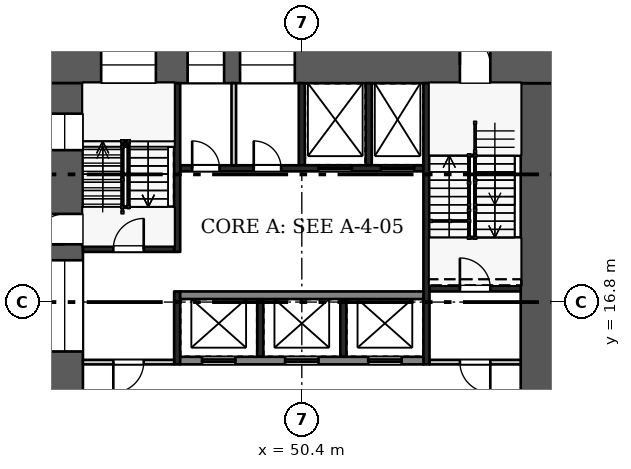
"""IFC4 building model, lengths in metres.
Left out: names, types, materials, properties, quantities, classifications, styles, units other than length and angle.
Written with IfcOpenShell. Run it as: python <this file> out.ifc"""

import sys

from ifc_helpers import new_model, si_unit, direction, frame, frame_2d, origin, place, context, subcontext, project, spatial, rectangle, extrude, element, fill, save


model = new_model("IFC4")
c1 = context("Model", 3, precision=1e-05, world=origin(), true_north=direction((0.0, 1.0)))
c2 = subcontext(c1, "Body", "Model", "MODEL_VIEW")
j1 = project(units=[si_unit("LENGTHUNIT", "METRE"), si_unit("PLANEANGLEUNIT", "RADIAN")], contexts=[c1])
p1 = place(None, origin())
s1 = spatial("IfcSite", under=j1, at=p1, CompositionType="ELEMENT")
p2 = place(p1, origin())
s2 = spatial("IfcBuilding", under=s1, at=p2, CompositionType="ELEMENT")
p3 = place(p2, origin())
s3 = spatial("IfcBuildingStorey", under=s2, at=p3, CompositionType="ELEMENT", Elevation=0.0)
p4 = place(p3, frame((42.0, 24.6, 0.0), z_axis=(0.0, 0.0, 1.0), x_axis=(1.0, 0.0, 0.0)))
e1 = element("IfcWall", 1, at=p4, inside=s3, PredefinedType="SHEAR", context=c2, shape_type="SweptSolid", body=[
    extrude(rectangle(XDim=16.8, YDim=1.2, at=frame_2d((8.4, 0.0))), origin(), (0.0, 0.0, 1.0), 8.7),
])
p5 = place(p4, frame((13.6, 0.0, 0.0)))
e2 = element("IfcOpeningElement", 2, at=p5, cuts=e1, PredefinedType="OPENING", context=c2, shape_type="SweptSolid", body=[
    extrude(rectangle(XDim=1.0, YDim=2.1, at=frame_2d((0.5, 1.05))), frame((0.0, 0.61, 0.0), z_axis=(0.0, -1.0, 0.0), x_axis=(1.0, 0.0, 0.0)), (0.0, 0.0, 1.0), 1.22),
])
p6 = place(p4, frame((1.8, 0.0, 0.5)))
e3 = element("IfcOpeningElement", 3, at=p6, cuts=e1, PredefinedType="OPENING", context=c2, shape_type="SweptSolid", body=[
    extrude(rectangle(XDim=1.8, YDim=2.4, at=frame_2d((0.9, 1.2))), frame((0.0, 0.61, 0.0), z_axis=(0.0, -1.0, 0.0), x_axis=(1.0, 0.0, 0.0)), (0.0, 0.0, 1.0), 1.22),
])
p7 = place(p4, frame((4.644, 0.0, 1.6)))
e4 = element("IfcOpeningElement", 4, at=p7, cuts=e1, PredefinedType="OPENING", context=c2, shape_type="SweptSolid", body=[
    extrude(rectangle(XDim=1.2, YDim=1.2, at=frame_2d((0.6, 0.6))), frame((0.0, 0.61, 0.0), z_axis=(0.0, -1.0, 0.0), x_axis=(1.0, 0.0, 0.0)), (0.0, 0.0, 1.0), 1.22),
])
p8 = place(p4, frame((6.369, 0.0, 1.6)))
e5 = element("IfcOpeningElement", 5, at=p8, cuts=e1, PredefinedType="OPENING", context=c2, shape_type="SweptSolid", body=[
    extrude(rectangle(XDim=1.8, YDim=1.2, at=frame_2d((0.9, 0.6))), frame((0.0, 0.61, 0.0), z_axis=(0.0, -1.0, 0.0), x_axis=(1.0, 0.0, 0.0)), (0.0, 0.0, 1.0), 1.22),
])
p9 = place(p3, frame((42.6, 9.6, 0.0), z_axis=(0.0, 0.0, 1.0), x_axis=(0.0, 1.0, 0.0)))
e6 = element("IfcWall", 6, at=p9, inside=s3, PredefinedType="SHEAR", context=c2, shape_type="SweptSolid", body=[
    extrude(rectangle(XDim=14.4, YDim=1.2, at=frame_2d((7.2, 0.0))), origin(), (0.0, 0.0, 1.0), 8.7),
])
p10 = place(p9, frame((2.1, 0.0, 0.0)))
e7 = element("IfcOpeningElement", 7, at=p10, cuts=e6, PredefinedType="OPENING", context=c2, shape_type="SweptSolid", body=[
    extrude(rectangle(XDim=1.8, YDim=2.1, at=frame_2d((0.9, 1.05))), frame((0.0, 0.61, 0.0), z_axis=(0.0, -1.0, 0.0), x_axis=(1.0, 0.0, 0.0)), (0.0, 0.0, 1.0), 1.22),
])
p11 = place(p9, frame((9.1, 0.0, 0.0)))
e8 = element("IfcOpeningElement", 8, at=p11, cuts=e6, PredefinedType="OPENING", context=c2, shape_type="SweptSolid", body=[
    extrude(rectangle(XDim=1.0, YDim=2.1, at=frame_2d((0.5, 1.05))), frame((0.0, 0.61, 0.0), z_axis=(0.0, -1.0, 0.0), x_axis=(1.0, 0.0, 0.0)), (0.0, 0.0, 1.0), 1.22),
])
p12 = place(p9, frame((5.575, 0.0, 0.6)))
e9 = element("IfcOpeningElement", 9, at=p12, cuts=e6, PredefinedType="OPENING", context=c2, shape_type="SweptSolid", body=[
    extrude(rectangle(XDim=3.0, YDim=2.1, at=frame_2d((1.5, 1.05))), frame((0.0, 0.61, 0.0), z_axis=(0.0, -1.0, 0.0), x_axis=(1.0, 0.0, 0.0)), (0.0, 0.0, 1.0), 1.22),
])
p13 = place(p9, frame((12.197, 0.0, 0.5)))
e10 = element("IfcOpeningElement", 10, at=p13, cuts=e6, PredefinedType="OPENING", context=c2, shape_type="SweptSolid", body=[
    extrude(rectangle(XDim=1.2, YDim=2.4, at=frame_2d((0.6, 1.2))), frame((0.0, 0.61, 0.0), z_axis=(0.0, -1.0, 0.0), x_axis=(1.0, 0.0, 0.0)), (0.0, 0.0, 1.0), 1.22),
])
p14 = place(p3, frame((58.2, 9.6, 0.0), z_axis=(0.0, 0.0, 1.0), x_axis=(0.0, 1.0, 0.0)))
e11 = element("IfcWall", 11, at=p14, inside=s3, PredefinedType="SHEAR", context=c2, shape_type="SweptSolid", body=[
    extrude(rectangle(XDim=14.4, YDim=1.2, at=frame_2d((7.2, 0.0))), origin(), (0.0, 0.0, 1.0), 8.7),
])
p15 = place(p14, frame((2.1, 0.0, 0.0)))
e12 = element("IfcOpeningElement", 12, at=p15, cuts=e11, PredefinedType="OPENING", context=c2, shape_type="SweptSolid", body=[
    extrude(rectangle(XDim=1.8, YDim=2.1, at=frame_2d((0.9, 1.05))), frame((0.0, 0.61, 0.0), z_axis=(0.0, -1.0, 0.0), x_axis=(1.0, 0.0, 0.0)), (0.0, 0.0, 1.0), 1.22),
])
for number, where, z_axis, x_axis in (
    (13, (49.033, 15.0, 0.0), (0.0, 0.0, 1.0), (0.0, 1.0, 0.0)),
    (14, (51.767, 15.0, 0.0), (0.0, 0.0, 1.0), (0.0, 1.0, 0.0)),
):
    element("IfcWall", number, at=place(p3, frame(where, z_axis=z_axis, x_axis=x_axis)), inside=s3, PredefinedType="SHEAR", context=c2, shape_type="SweptSolid", body=[
        extrude(rectangle(XDim=1.9, YDim=0.2, at=frame_2d((0.95, 0.0))), origin(), (0.0, 0.0, 1.0), 8.7),
    ])
p16 = place(p3, frame((46.4, 14.875, 0.0), z_axis=(0.0, 0.0, 1.0), x_axis=(1.0, 0.0, 0.0)))
e15 = element("IfcWall", 15, at=p16, inside=s3, PredefinedType="SHEAR", context=c2, shape_type="SweptSolid", body=[
    extrude(rectangle(XDim=8.0, YDim=0.25, at=frame_2d((4.0, 0.0))), origin(), (0.0, 0.0, 1.0), 8.7),
])
p17 = place(p16, frame((0.717, 0.0, 0.0)))
e16 = element("IfcOpeningElement", 16, at=p17, cuts=e15, PredefinedType="OPENING", context=c2, shape_type="SweptSolid", body=[
    extrude(rectangle(XDim=1.1, YDim=2.1, at=frame_2d((0.55, 1.05))), frame((0.0, 0.135, 0.0), z_axis=(0.0, -1.0, 0.0), x_axis=(1.0, 0.0, 0.0)), (0.0, 0.0, 1.0), 0.27),
])
p18 = place(p16, frame((3.45, 0.0, 0.0)))
e17 = element("IfcOpeningElement", 17, at=p18, cuts=e15, PredefinedType="OPENING", context=c2, shape_type="SweptSolid", body=[
    extrude(rectangle(XDim=1.1, YDim=2.1, at=frame_2d((0.55, 1.05))), frame((0.0, 0.135, 0.0), z_axis=(0.0, -1.0, 0.0), x_axis=(1.0, 0.0, 0.0)), (0.0, 0.0, 1.0), 0.27),
])
p19 = place(p16, frame((6.183, 0.0, 0.0)))
e18 = element("IfcOpeningElement", 18, at=p19, cuts=e15, PredefinedType="OPENING", context=c2, shape_type="SweptSolid", body=[
    extrude(rectangle(XDim=1.1, YDim=2.1, at=frame_2d((0.55, 1.05))), frame((0.0, 0.135, 0.0), z_axis=(0.0, -1.0, 0.0), x_axis=(1.0, 0.0, 0.0)), (0.0, 0.0, 1.0), 0.27),
])
p20 = place(p3, frame((46.4, 17.025, 0.0), z_axis=(0.0, 0.0, 1.0), x_axis=(1.0, 0.0, 0.0)))
e19 = element("IfcWall", 19, at=p20, inside=s3, PredefinedType="SHEAR", context=c2, shape_type="SweptSolid", body=[
    extrude(rectangle(XDim=8.0, YDim=0.25, at=frame_2d((4.0, 0.0))), origin(), (0.0, 0.0, 1.0), 8.7),
])
for number, where, z_axis, x_axis in (
    (20, (50.4, 21.3, 0.0), (0.0, 0.0, 1.0), (0.0, 1.0, 0.0)),
    (21, (52.6, 21.3, 0.0), (0.0, 0.0, 1.0), (0.0, 1.0, 0.0)),
):
    element("IfcWall", number, at=place(p3, frame(where, z_axis=z_axis, x_axis=x_axis)), inside=s3, PredefinedType="SHEAR", context=c2, shape_type="SweptSolid", body=[
        extrude(rectangle(XDim=2.7, YDim=0.2, at=frame_2d((1.35, 0.0))), origin(), (0.0, 0.0, 1.0), 8.7),
    ])
p21 = place(p3, frame((48.163, 21.3, 0.0), z_axis=(0.0, 0.0, 1.0), x_axis=(0.0, 1.0, 0.0)))
e22 = element("IfcWall", 22, at=p21, inside=s3, PredefinedType="PARTITIONING", context=c2, shape_type="SweptSolid", body=[
    extrude(rectangle(XDim=2.7, YDim=0.15, at=frame_2d((1.35, 0.0))), origin(), (0.0, 0.0, 1.0), 8.7),
])
p22 = place(p3, frame((46.4, 21.2, 0.0), z_axis=(0.0, 0.0, 1.0), x_axis=(1.0, 0.0, 0.0)))
e23 = element("IfcWall", 23, at=p22, inside=s3, PredefinedType="SHEAR", context=c2, shape_type="SweptSolid", body=[
    extrude(rectangle(XDim=8.0, YDim=0.2, at=frame_2d((4.0, 0.0))), origin(), (0.0, 0.0, 1.0), 8.7),
])
p23 = place(p22, frame((0.394, 0.0, 0.0)))
e24 = element("IfcOpeningElement", 24, at=p23, cuts=e23, PredefinedType="OPENING", context=c2, shape_type="SweptSolid", body=[
    extrude(rectangle(XDim=0.9, YDim=2.1, at=frame_2d((0.45, 1.05))), frame((0.0, 0.11, 0.0), z_axis=(0.0, -1.0, 0.0), x_axis=(1.0, 0.0, 0.0)), (0.0, 0.0, 1.0), 0.22),
])
p24 = place(p22, frame((2.419, 0.0, 0.0)))
e25 = element("IfcOpeningElement", 25, at=p24, cuts=e23, PredefinedType="OPENING", context=c2, shape_type="SweptSolid", body=[
    extrude(rectangle(XDim=0.9, YDim=2.1, at=frame_2d((0.45, 1.05))), frame((0.0, 0.11, 0.0), z_axis=(0.0, -1.0, 0.0), x_axis=(1.0, 0.0, 0.0)), (0.0, 0.0, 1.0), 0.22),
])
p25 = place(p22, frame((4.55, 0.0, 0.0)))
e26 = element("IfcOpeningElement", 26, at=p25, cuts=e23, PredefinedType="OPENING", context=c2, shape_type="SweptSolid", body=[
    extrude(rectangle(XDim=1.1, YDim=2.1, at=frame_2d((0.55, 1.05))), frame((0.0, 0.11, 0.0), z_axis=(0.0, -1.0, 0.0), x_axis=(1.0, 0.0, 0.0)), (0.0, 0.0, 1.0), 0.22),
])
p26 = place(p22, frame((6.6, 0.0, 0.0)))
e27 = element("IfcOpeningElement", 27, at=p26, cuts=e23, PredefinedType="OPENING", context=c2, shape_type="SweptSolid", body=[
    extrude(rectangle(XDim=1.1, YDim=2.1, at=frame_2d((0.55, 1.05))), frame((0.0, 0.11, 0.0), z_axis=(0.0, -1.0, 0.0), x_axis=(1.0, 0.0, 0.0)), (0.0, 0.0, 1.0), 0.22),
])
p27 = place(p3, frame((46.3, 14.75, 0.0), z_axis=(0.0, 0.0, 1.0), x_axis=(0.0, 1.0, 0.0)))
e28 = element("IfcWall", 28, at=p27, inside=s3, PredefinedType="SHEAR", context=c2, shape_type="SweptSolid", body=[
    extrude(rectangle(XDim=2.4, YDim=0.2, at=frame_2d((1.2, 0.0))), origin(), (0.0, 0.0, 1.0), 8.7),
])
p28 = place(p3, frame((46.3, 18.45, 0.0), z_axis=(0.0, 0.0, 1.0), x_axis=(0.0, 1.0, 0.0)))
e29 = element("IfcWall", 29, at=p28, inside=s3, PredefinedType="SHEAR", context=c2, shape_type="SweptSolid", body=[
    extrude(rectangle(XDim=5.55, YDim=0.2, at=frame_2d((2.775, 0.0))), origin(), (0.0, 0.0, 1.0), 8.7),
])
p29 = place(p3, frame((43.2, 14.825, 0.0), z_axis=(0.0, 0.0, 1.0), x_axis=(1.0, 0.0, 0.0)))
e30 = element("IfcWall", 30, at=p29, inside=s3, PredefinedType="PARTITIONING", context=c2, shape_type="SweptSolid", body=[
    extrude(rectangle(XDim=3.0, YDim=0.15, at=frame_2d((1.5, 0.0))), origin(), (0.0, 0.0, 1.0), 8.7),
])
p30 = place(p29, frame((1.0, 0.0, 0.0)))
e31 = element("IfcOpeningElement", 31, at=p30, cuts=e30, PredefinedType="OPENING", context=c2, shape_type="SweptSolid", body=[
    extrude(rectangle(XDim=1.0, YDim=2.1, at=frame_2d((0.5, 1.05))), frame((0.0, 0.085, 0.0), z_axis=(0.0, -1.0, 0.0), x_axis=(1.0, 0.0, 0.0)), (0.0, 0.0, 1.0), 0.17),
])
p31 = place(p3, frame((43.2, 18.55, 0.0), z_axis=(0.0, 0.0, 1.0), x_axis=(1.0, 0.0, 0.0)))
e32 = element("IfcWall", 32, at=p31, inside=s3, PredefinedType="SHEAR", context=c2, shape_type="SweptSolid", body=[
    extrude(rectangle(XDim=3.0, YDim=0.2, at=frame_2d((1.5, 0.0))), origin(), (0.0, 0.0, 1.0), 8.7),
])
p32 = place(p31, frame((1.0, 0.0, 0.0)))
e33 = element("IfcOpeningElement", 33, at=p32, cuts=e32, PredefinedType="OPENING", context=c2, shape_type="SweptSolid", body=[
    extrude(rectangle(XDim=1.0, YDim=2.1, at=frame_2d((0.5, 1.05))), frame((0.0, 0.11, 0.0), z_axis=(0.0, -1.0, 0.0), x_axis=(1.0, 0.0, 0.0)), (0.0, 0.0, 1.0), 0.22),
])
p33 = place(p3, frame((54.5, 14.75, 0.0), z_axis=(0.0, 0.0, 1.0), x_axis=(0.0, 1.0, 0.0)))
e34 = element("IfcWall", 34, at=p33, inside=s3, PredefinedType="SHEAR", context=c2, shape_type="SweptSolid", body=[
    extrude(rectangle(XDim=9.25, YDim=0.2, at=frame_2d((4.625, 0.0))), origin(), (0.0, 0.0, 1.0), 8.7),
])
p34 = place(p3, frame((54.6, 14.825, 0.0), z_axis=(0.0, 0.0, 1.0), x_axis=(1.0, 0.0, 0.0)))
e35 = element("IfcWall", 35, at=p34, inside=s3, PredefinedType="PARTITIONING", context=c2, shape_type="SweptSolid", body=[
    extrude(rectangle(XDim=3.0, YDim=0.15, at=frame_2d((1.5, 0.0))), origin(), (0.0, 0.0, 1.0), 8.7),
])
p35 = place(p34, frame((1.0, 0.0, 0.0)))
e36 = element("IfcOpeningElement", 36, at=p35, cuts=e35, PredefinedType="OPENING", context=c2, shape_type="SweptSolid", body=[
    extrude(rectangle(XDim=1.0, YDim=2.1, at=frame_2d((0.5, 1.05))), frame((0.0, 0.085, 0.0), z_axis=(0.0, -1.0, 0.0), x_axis=(1.0, 0.0, 0.0)), (0.0, 0.0, 1.0), 0.17),
])
p36 = place(p3, frame((54.6, 17.25, 0.0), z_axis=(0.0, 0.0, 1.0), x_axis=(1.0, 0.0, 0.0)))
e37 = element("IfcWall", 37, at=p36, inside=s3, PredefinedType="SHEAR", context=c2, shape_type="SweptSolid", body=[
    extrude(rectangle(XDim=3.0, YDim=0.2, at=frame_2d((1.5, 0.0))), origin(), (0.0, 0.0, 1.0), 8.7),
])
p37 = place(p36, frame((1.0, 0.0, 0.0)))
e38 = element("IfcOpeningElement", 38, at=p37, cuts=e37, PredefinedType="OPENING", context=c2, shape_type="SweptSolid", body=[
    extrude(rectangle(XDim=1.0, YDim=2.1, at=frame_2d((0.5, 1.05))), frame((0.0, 0.11, 0.0), z_axis=(0.0, -1.0, 0.0), x_axis=(1.0, 0.0, 0.0)), (0.0, 0.0, 1.0), 0.22),
])
p38 = place(p5, origin())
e39 = element("IfcDoor", 39, at=p38, inside=s3, OperationType="SINGLE_SWING_LEFT", PredefinedType="DOOR", context=c2, shape_type="SweptSolid", body=[
    extrude(rectangle(XDim=1.0, YDim=2.1, at=frame_2d((0.5, 1.05))), frame((0.0, 0.025, 0.0), z_axis=(0.0, -1.0, 0.0), x_axis=(1.0, 0.0, 0.0)), (0.0, 0.0, 1.0), 0.05),
])
fill(e2, e39)
p39 = place(p11, origin())
e40 = element("IfcDoor", 40, at=p39, inside=s3, OperationType="SINGLE_SWING_LEFT", PredefinedType="DOOR", context=c2, shape_type="SweptSolid", body=[
    extrude(rectangle(XDim=1.0, YDim=2.1, at=frame_2d((0.5, 1.05))), frame((0.0, 0.025, 0.0), z_axis=(0.0, -1.0, 0.0), x_axis=(1.0, 0.0, 0.0)), (0.0, 0.0, 1.0), 0.05),
])
fill(e8, e40)
p40 = place(p17, origin())
e41 = element("IfcDoor", 41, at=p40, inside=s3, OperationType="DOUBLE_DOOR_SLIDING", PredefinedType="DOOR", context=c2, shape_type="SweptSolid", body=[
    extrude(rectangle(XDim=1.1, YDim=2.1, at=frame_2d((0.55, 1.05))), frame((0.0, 0.025, 0.0), z_axis=(0.0, -1.0, 0.0), x_axis=(1.0, 0.0, 0.0)), (0.0, 0.0, 1.0), 0.05),
])
fill(e16, e41)
p41 = place(p18, origin())
e42 = element("IfcDoor", 42, at=p41, inside=s3, OperationType="DOUBLE_DOOR_SLIDING", PredefinedType="DOOR", context=c2, shape_type="SweptSolid", body=[
    extrude(rectangle(XDim=1.1, YDim=2.1, at=frame_2d((0.55, 1.05))), frame((0.0, 0.025, 0.0), z_axis=(0.0, -1.0, 0.0), x_axis=(1.0, 0.0, 0.0)), (0.0, 0.0, 1.0), 0.05),
])
fill(e17, e42)
p42 = place(p19, origin())
e43 = element("IfcDoor", 43, at=p42, inside=s3, OperationType="DOUBLE_DOOR_SLIDING", PredefinedType="DOOR", context=c2, shape_type="SweptSolid", body=[
    extrude(rectangle(XDim=1.1, YDim=2.1, at=frame_2d((0.55, 1.05))), frame((0.0, 0.025, 0.0), z_axis=(0.0, -1.0, 0.0), x_axis=(1.0, 0.0, 0.0)), (0.0, 0.0, 1.0), 0.05),
])
fill(e18, e43)
p43 = place(p23, origin())
e44 = element("IfcDoor", 44, at=p43, inside=s3, OperationType="SINGLE_SWING_LEFT", PredefinedType="DOOR", context=c2, shape_type="SweptSolid", body=[
    extrude(rectangle(XDim=0.9, YDim=2.1, at=frame_2d((0.45, 1.05))), frame((0.0, 0.025, 0.0), z_axis=(0.0, -1.0, 0.0), x_axis=(1.0, 0.0, 0.0)), (0.0, 0.0, 1.0), 0.05),
])
fill(e24, e44)
p44 = place(p24, origin())
e45 = element("IfcDoor", 45, at=p44, inside=s3, OperationType="SINGLE_SWING_LEFT", PredefinedType="DOOR", context=c2, shape_type="SweptSolid", body=[
    extrude(rectangle(XDim=0.9, YDim=2.1, at=frame_2d((0.45, 1.05))), frame((0.0, 0.025, 0.0), z_axis=(0.0, -1.0, 0.0), x_axis=(1.0, 0.0, 0.0)), (0.0, 0.0, 1.0), 0.05),
])
fill(e25, e45)
p45 = place(p25, origin())
e46 = element("IfcDoor", 46, at=p45, inside=s3, OperationType="DOUBLE_DOOR_SLIDING", PredefinedType="DOOR", context=c2, shape_type="SweptSolid", body=[
    extrude(rectangle(XDim=1.1, YDim=2.1, at=frame_2d((0.55, 1.05))), frame((0.0, 0.025, 0.0), z_axis=(0.0, -1.0, 0.0), x_axis=(1.0, 0.0, 0.0)), (0.0, 0.0, 1.0), 0.05),
])
fill(e26, e46)
p46 = place(p26, origin())
e47 = element("IfcDoor", 47, at=p46, inside=s3, OperationType="DOUBLE_DOOR_SLIDING", PredefinedType="DOOR", context=c2, shape_type="SweptSolid", body=[
    extrude(rectangle(XDim=1.1, YDim=2.1, at=frame_2d((0.55, 1.05))), frame((0.0, 0.025, 0.0), z_axis=(0.0, -1.0, 0.0), x_axis=(1.0, 0.0, 0.0)), (0.0, 0.0, 1.0), 0.05),
])
fill(e27, e47)
p47 = place(p30, frame((1.0, 0.0, 0.0), z_axis=(0.0, 0.0, 1.0), x_axis=(-1.0, 0.0, 0.0)))
e48 = element("IfcDoor", 48, at=p47, inside=s3, OperationType="SINGLE_SWING_RIGHT", PredefinedType="DOOR", context=c2, shape_type="SweptSolid", body=[
    extrude(rectangle(XDim=1.0, YDim=2.1, at=frame_2d((0.5, 1.05))), frame((0.0, 0.025, 0.0), z_axis=(0.0, -1.0, 0.0), x_axis=(1.0, 0.0, 0.0)), (0.0, 0.0, 1.0), 0.05),
])
fill(e31, e48)
p48 = place(p32, origin())
e49 = element("IfcDoor", 49, at=p48, inside=s3, OperationType="SINGLE_SWING_RIGHT", PredefinedType="DOOR", context=c2, shape_type="SweptSolid", body=[
    extrude(rectangle(XDim=1.0, YDim=2.1, at=frame_2d((0.5, 1.05))), frame((0.0, 0.025, 0.0), z_axis=(0.0, -1.0, 0.0), x_axis=(1.0, 0.0, 0.0)), (0.0, 0.0, 1.0), 0.05),
])
fill(e33, e49)
p49 = place(p35, frame((1.0, 0.0, 0.0), z_axis=(0.0, 0.0, 1.0), x_axis=(-1.0, 0.0, 0.0)))
e50 = element("IfcDoor", 50, at=p49, inside=s3, OperationType="SINGLE_SWING_LEFT", PredefinedType="DOOR", context=c2, shape_type="SweptSolid", body=[
    extrude(rectangle(XDim=1.0, YDim=2.1, at=frame_2d((0.5, 1.05))), frame((0.0, 0.025, 0.0), z_axis=(0.0, -1.0, 0.0), x_axis=(1.0, 0.0, 0.0)), (0.0, 0.0, 1.0), 0.05),
])
fill(e36, e50)
p50 = place(p37, origin())
e51 = element("IfcDoor", 51, at=p50, inside=s3, OperationType="SINGLE_SWING_LEFT", PredefinedType="DOOR", context=c2, shape_type="SweptSolid", body=[
    extrude(rectangle(XDim=1.0, YDim=2.1, at=frame_2d((0.5, 1.05))), frame((0.0, 0.025, 0.0), z_axis=(0.0, -1.0, 0.0), x_axis=(1.0, 0.0, 0.0)), (0.0, 0.0, 1.0), 0.05),
])
fill(e38, e51)
p51 = place(p6, origin())
e52 = element("IfcWindow", 52, at=p51, inside=s3, PartitioningType="SINGLE_PANEL", PredefinedType="WINDOW", context=c2, shape_type="SweptSolid", body=[
    extrude(rectangle(XDim=1.8, YDim=2.4, at=frame_2d((0.9, 1.2))), frame((0.0, 0.03, 0.0), z_axis=(0.0, -1.0, 0.0), x_axis=(1.0, 0.0, 0.0)), (0.0, 0.0, 1.0), 0.06),
])
fill(e3, e52)
p52 = place(p7, origin())
e53 = element("IfcWindow", 53, at=p52, inside=s3, PartitioningType="SINGLE_PANEL", PredefinedType="WINDOW", context=c2, shape_type="SweptSolid", body=[
    extrude(rectangle(XDim=1.2, YDim=1.2, at=frame_2d((0.6, 0.6))), frame((0.0, 0.03, 0.0), z_axis=(0.0, -1.0, 0.0), x_axis=(1.0, 0.0, 0.0)), (0.0, 0.0, 1.0), 0.06),
])
fill(e4, e53)
p53 = place(p8, origin())
e54 = element("IfcWindow", 54, at=p53, inside=s3, PartitioningType="SINGLE_PANEL", PredefinedType="WINDOW", context=c2, shape_type="SweptSolid", body=[
    extrude(rectangle(XDim=1.8, YDim=1.2, at=frame_2d((0.9, 0.6))), frame((0.0, 0.03, 0.0), z_axis=(0.0, -1.0, 0.0), x_axis=(1.0, 0.0, 0.0)), (0.0, 0.0, 1.0), 0.06),
])
fill(e5, e54)
p54 = place(p12, origin())
e55 = element("IfcWindow", 55, at=p54, inside=s3, PartitioningType="SINGLE_PANEL", PredefinedType="WINDOW", context=c2, shape_type="SweptSolid", body=[
    extrude(rectangle(XDim=3.0, YDim=2.1, at=frame_2d((1.5, 1.05))), frame((0.0, 0.03, 0.0), z_axis=(0.0, -1.0, 0.0), x_axis=(1.0, 0.0, 0.0)), (0.0, 0.0, 1.0), 0.06),
])
fill(e9, e55)
p55 = place(p13, origin())
e56 = element("IfcWindow", 56, at=p55, inside=s3, PartitioningType="SINGLE_PANEL", PredefinedType="WINDOW", context=c2, shape_type="SweptSolid", body=[
    extrude(rectangle(XDim=1.2, YDim=2.4, at=frame_2d((0.6, 1.2))), frame((0.0, 0.03, 0.0), z_axis=(0.0, -1.0, 0.0), x_axis=(1.0, 0.0, 0.0)), (0.0, 0.0, 1.0), 0.06),
])
fill(e10, e56)
save(model, sys.argv[1])
